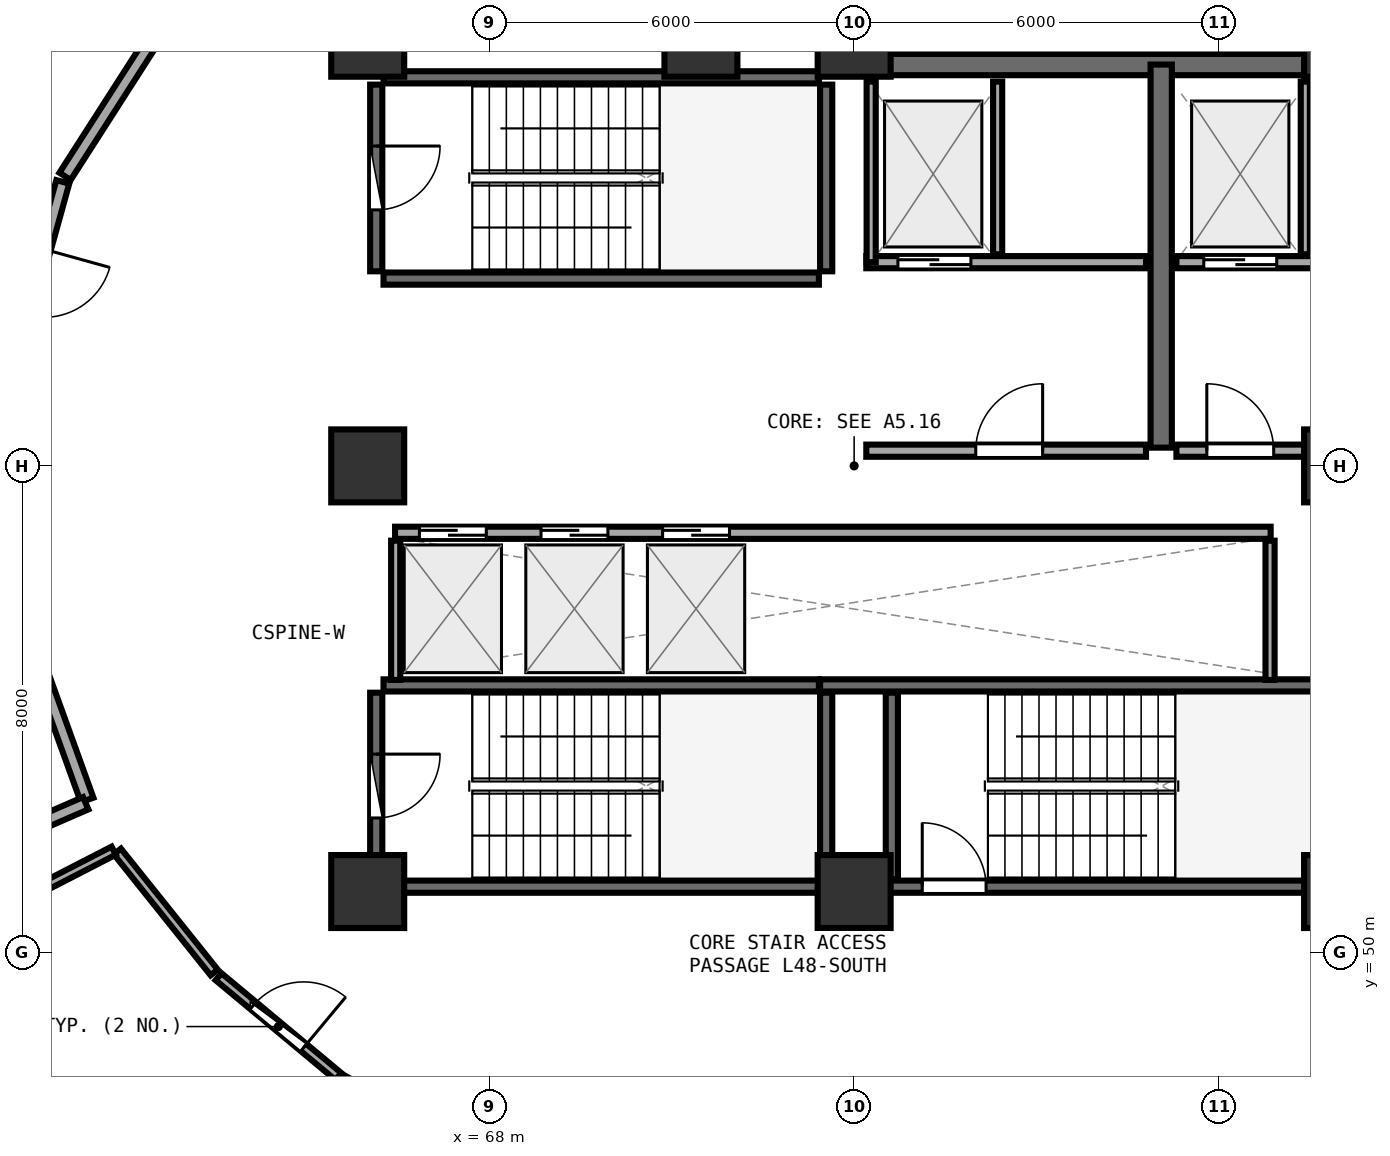
"""IFC4 building model, lengths in metres.
Left out: names, types, materials, properties, quantities, classifications, styles, units other than length and angle.
Written with IfcOpenShell. Run it as: python <this file> out.ifc"""

import sys

from ifc_helpers import new_model, si_unit, direction, frame, frame_2d, origin, origin_2d, place, context, subcontext, project, spatial, rectangle, extrude, element, fill, save


model = new_model("IFC4")
c1 = context("Model", 3, precision=1e-05, world=origin(), true_north=direction((0.0, 1.0)))
c2 = subcontext(c1, "Body", "Model", "MODEL_VIEW")
j1 = project(units=[si_unit("LENGTHUNIT", "METRE"), si_unit("PLANEANGLEUNIT", "RADIAN")], contexts=[c1])
p1 = place(None, origin())
s1 = spatial("IfcSite", under=j1, at=p1, CompositionType="ELEMENT")
p2 = place(p1, origin())
s2 = spatial("IfcBuilding", under=s1, at=p2, CompositionType="ELEMENT")
p3 = place(p2, frame((0.0, 0.0, 189.11)))
s3 = spatial("IfcBuildingStorey", under=s2, at=p3, CompositionType="ELEMENT", Elevation=189.11)
for number, where, z_axis, x_axis in (
    (1, (66.0, 51.0, 0.0), (0.0, 0.0, 1.0), (1.0, 0.0, 0.0)),
    (2, (74.0, 51.0, 0.0), (0.0, 0.0, 1.0), (1.0, 0.0, 0.0)),
    (3, (82.0, 51.0, 0.0), (0.0, 0.0, 1.0), (1.0, 0.0, 0.0)),
    (4, (82.0, 58.0, 0.0), (0.0, 0.0, 1.0), (1.0, 0.0, 0.0)),
    (5, (82.0, 65.0, 0.0), (0.0, 0.0, 1.0), (1.0, 0.0, 0.0)),
    (6, (74.0, 65.0, 0.0), (0.0, 0.0, 1.0), (1.0, 0.0, 0.0)),
    (7, (71.48, 65.0, 0.0), (0.0, 0.0, 1.0), (1.0, 0.0, 0.0)),
    (8, (66.0, 65.0, 0.0), (0.0, 0.0, 1.0), (1.0, 0.0, 0.0)),
    (9, (66.0, 58.0, 0.0), (0.0, 0.0, 1.0), (1.0, 0.0, 0.0)),
):
    element("IfcColumn", number, at=place(p3, frame(where, z_axis=z_axis, x_axis=x_axis)), inside=s3, PredefinedType="PILASTER", context=c2, shape_type="SweptSolid", body=[
        extrude(rectangle(XDim=1.2, YDim=1.2, at=origin_2d()), origin(), (0.0, 0.0, 1.0), 4.09),
    ])
p4 = place(p3, frame((66.26, 61.08, 0.0), z_axis=(0.0, 0.0, 1.0), x_axis=(1.0, 0.0, 0.0)))
e10 = element("IfcWall", 10, at=p4, inside=s3, PredefinedType="SHEAR", context=c2, shape_type="SweptSolid", body=[
    extrude(rectangle(XDim=7.16, YDim=0.2, at=frame_2d((3.58, 0.0))), origin(), (0.0, 0.0, 1.0), 3.83),
])
p5 = place(p3, frame((73.54, 61.2, 0.0), z_axis=(0.0, 0.0, 1.0), x_axis=(0.0, 1.0, 0.0)))
e11 = element("IfcWall", 11, at=p5, inside=s3, PredefinedType="SHEAR", context=c2, shape_type="SweptSolid", body=[
    extrude(rectangle(XDim=3.07, YDim=0.2, at=frame_2d((1.535, 0.0))), origin(), (0.0, 0.0, 1.0), 3.83),
])
p6 = place(p3, frame((73.42, 64.39, 0.0), z_axis=(0.0, 0.0, 1.0), x_axis=(-1.0, 0.0, 0.0)))
e12 = element("IfcWall", 12, at=p6, inside=s3, PredefinedType="SHEAR", context=c2, shape_type="SweptSolid", body=[
    extrude(rectangle(XDim=7.16, YDim=0.2, at=frame_2d((3.58, 0.0))), origin(), (0.0, 0.0, 1.0), 3.83),
])
p7 = place(p3, frame((66.14, 64.27, 0.0), z_axis=(0.0, 0.0, 1.0), x_axis=(0.0, -1.0, 0.0)))
e13 = element("IfcWall", 13, at=p7, inside=s3, PredefinedType="SHEAR", context=c2, shape_type="SweptSolid", body=[
    extrude(rectangle(XDim=3.07, YDim=0.2, at=frame_2d((1.535, 0.0))), origin(), (0.0, 0.0, 1.0), 3.83),
])
p8 = place(p7, frame((1.01, 0.0, 0.0)))
e14 = element("IfcOpeningElement", 14, at=p8, cuts=e13, PredefinedType="OPENING", context=c2, shape_type="SweptSolid", body=[
    extrude(rectangle(XDim=1.05, YDim=2.1, at=frame_2d((0.525, 1.05))), frame((0.0, 0.11, 0.0), z_axis=(0.0, -1.0, 0.0), x_axis=(1.0, 0.0, 0.0)), (0.0, 0.0, 1.0), 0.22),
])
p9 = place(p3, frame((74.0, 51.08, 0.0), z_axis=(0.0, 0.0, 1.0), x_axis=(1.0, 0.0, 0.0)))
e15 = element("IfcWall", 15, at=p9, inside=s3, PredefinedType="SHEAR", context=c2, shape_type="SweptSolid", body=[
    extrude(rectangle(XDim=7.9, YDim=0.2, at=frame_2d((3.95, 0.0))), origin(), (0.0, 0.0, 1.0), 3.83),
])
p10 = place(p9, frame((1.12, 0.0, 0.0)))
e16 = element("IfcOpeningElement", 16, at=p10, cuts=e15, PredefinedType="OPENING", context=c2, shape_type="SweptSolid", body=[
    extrude(rectangle(XDim=1.05, YDim=2.1, at=frame_2d((0.525, 1.05))), frame((0.0, 0.11, 0.0), z_axis=(0.0, -1.0, 0.0), x_axis=(1.0, 0.0, 0.0)), (0.0, 0.0, 1.0), 0.22),
])
p11 = place(p3, frame((81.9, 54.39, 0.0), z_axis=(0.0, 0.0, 1.0), x_axis=(-1.0, 0.0, 0.0)))
e17 = element("IfcWall", 17, at=p11, inside=s3, PredefinedType="SHEAR", context=c2, shape_type="SweptSolid", body=[
    extrude(rectangle(XDim=8.46, YDim=0.2, at=frame_2d((4.23, 0.0))), origin(), (0.0, 0.0, 1.0), 3.83),
])
p12 = place(p3, frame((74.62, 54.27, 0.0), z_axis=(0.0, 0.0, 1.0), x_axis=(0.0, -1.0, 0.0)))
e18 = element("IfcWall", 18, at=p12, inside=s3, PredefinedType="SHEAR", context=c2, shape_type="SweptSolid", body=[
    extrude(rectangle(XDim=3.07, YDim=0.2, at=frame_2d((1.535, 0.0))), origin(), (0.0, 0.0, 1.0), 3.83),
])
p13 = place(p3, frame((66.26, 51.08, 0.0), z_axis=(0.0, 0.0, 1.0), x_axis=(1.0, 0.0, 0.0)))
e19 = element("IfcWall", 19, at=p13, inside=s3, PredefinedType="SHEAR", context=c2, shape_type="SweptSolid", body=[
    extrude(rectangle(XDim=7.16, YDim=0.2, at=frame_2d((3.58, 0.0))), origin(), (0.0, 0.0, 1.0), 3.83),
])
p14 = place(p3, frame((73.54, 51.2, 0.0), z_axis=(0.0, 0.0, 1.0), x_axis=(0.0, 1.0, 0.0)))
e20 = element("IfcWall", 20, at=p14, inside=s3, PredefinedType="SHEAR", context=c2, shape_type="SweptSolid", body=[
    extrude(rectangle(XDim=3.07, YDim=0.2, at=frame_2d((1.535, 0.0))), origin(), (0.0, 0.0, 1.0), 3.83),
])
p15 = place(p3, frame((73.42, 54.39, 0.0), z_axis=(0.0, 0.0, 1.0), x_axis=(-1.0, 0.0, 0.0)))
e21 = element("IfcWall", 21, at=p15, inside=s3, PredefinedType="SHEAR", context=c2, shape_type="SweptSolid", body=[
    extrude(rectangle(XDim=7.16, YDim=0.2, at=frame_2d((3.58, 0.0))), origin(), (0.0, 0.0, 1.0), 3.83),
])
p16 = place(p3, frame((66.14, 54.27, 0.0), z_axis=(0.0, 0.0, 1.0), x_axis=(0.0, -1.0, 0.0)))
e22 = element("IfcWall", 22, at=p16, inside=s3, PredefinedType="SHEAR", context=c2, shape_type="SweptSolid", body=[
    extrude(rectangle(XDim=3.07, YDim=0.2, at=frame_2d((1.535, 0.0))), origin(), (0.0, 0.0, 1.0), 3.83),
])
p17 = place(p16, frame((1.01, 0.0, 0.0)))
e23 = element("IfcOpeningElement", 23, at=p17, cuts=e22, PredefinedType="OPENING", context=c2, shape_type="SweptSolid", body=[
    extrude(rectangle(XDim=1.05, YDim=2.1, at=frame_2d((0.525, 1.05))), frame((0.0, 0.11, 0.0), z_axis=(0.0, -1.0, 0.0), x_axis=(1.0, 0.0, 0.0)), (0.0, 0.0, 1.0), 0.22),
])
p18 = place(p3, frame((74.0, 64.6, 0.0), z_axis=(0.0, 0.0, 1.0), x_axis=(1.0, 0.0, 0.0)))
e24 = element("IfcWall", 24, at=p18, inside=s3, PredefinedType="SHEAR", context=c2, shape_type="SweptSolid", body=[
    extrude(rectangle(XDim=8.0, YDim=0.35, at=frame_2d((4.0, 0.0))), origin(), (0.0, 0.0, 1.0), 3.83),
])
p19 = place(p3, frame((79.05, 58.3, 0.0), z_axis=(0.0, 0.0, 1.0), x_axis=(0.0, 1.0, 0.0)))
e25 = element("IfcWall", 25, at=p19, inside=s3, PredefinedType="SHEAR", context=c2, shape_type="SweptSolid", body=[
    extrude(rectangle(XDim=6.3, YDim=0.35, at=frame_2d((3.15, 0.0))), origin(), (0.0, 0.0, 1.0), 3.83),
])
p20 = place(p3, frame((74.2, 61.35, 0.0), z_axis=(0.0, 0.0, 1.0), x_axis=(1.0, 0.0, 0.0)))
e26 = element("IfcWall", 26, at=p20, inside=s3, PredefinedType="SOLIDWALL", context=c2, shape_type="SweptSolid", body=[
    extrude(rectangle(XDim=4.6, YDim=0.2, at=frame_2d((2.3, 0.0))), origin(), (0.0, 0.0, 1.0), 3.82),
])
p21 = place(p20, frame((0.52, 0.0, 0.0)))
e27 = element("IfcOpeningElement", 27, at=p21, cuts=e26, PredefinedType="OPENING", context=c2, shape_type="SweptSolid", body=[
    extrude(rectangle(XDim=1.2, YDim=2.15, at=frame_2d((0.6, 1.075))), frame((0.0, 0.11, 0.0), z_axis=(0.0, -1.0, 0.0), x_axis=(1.0, 0.0, 0.0)), (0.0, 0.0, 1.0), 0.22),
])
p22 = place(p3, frame((74.28, 61.35, 0.0), z_axis=(0.0, 0.0, 1.0), x_axis=(0.0, 1.0, 0.0)))
e28 = element("IfcWall", 28, at=p22, inside=s3, PredefinedType="PARTITIONING", context=c2, shape_type="SweptSolid", body=[
    extrude(rectangle(XDim=2.97, YDim=0.15, at=frame_2d((1.485, 0.0))), origin(), (0.0, 0.0, 1.0), 3.82),
])
p23 = place(p3, frame((76.36, 61.48, 0.0), z_axis=(0.0, 0.0, 1.0), x_axis=(0.0, 1.0, 0.0)))
e29 = element("IfcWall", 29, at=p23, inside=s3, PredefinedType="PARTITIONING", context=c2, shape_type="SweptSolid", body=[
    extrude(rectangle(XDim=2.84, YDim=0.15, at=frame_2d((1.42, 0.0))), origin(), (0.0, 0.0, 1.0), 3.82),
])
p24 = place(p3, frame((79.3, 61.35, 0.0), z_axis=(0.0, 0.0, 1.0), x_axis=(1.0, 0.0, 0.0)))
e30 = element("IfcWall", 30, at=p24, inside=s3, PredefinedType="SOLIDWALL", context=c2, shape_type="SweptSolid", body=[
    extrude(rectangle(XDim=4.0, YDim=0.2, at=frame_2d((2.0, 0.0))), origin(), (0.0, 0.0, 1.0), 3.115),
])
p25 = place(p24, frame((0.45, 0.0, 0.0)))
e31 = element("IfcOpeningElement", 31, at=p25, cuts=e30, PredefinedType="OPENING", context=c2, shape_type="SweptSolid", body=[
    extrude(rectangle(XDim=1.2, YDim=2.15, at=frame_2d((0.6, 1.075))), frame((0.0, 0.11, 0.0), z_axis=(0.0, -1.0, 0.0), x_axis=(1.0, 0.0, 0.0)), (0.0, 0.0, 1.0), 0.22),
])
p26 = place(p3, frame((81.42, 61.48, 0.0), z_axis=(0.0, 0.0, 1.0), x_axis=(0.0, 1.0, 0.0)))
e32 = element("IfcWall", 32, at=p26, inside=s3, PredefinedType="PARTITIONING", context=c2, shape_type="SweptSolid", body=[
    extrude(rectangle(XDim=2.84, YDim=0.15, at=frame_2d((1.42, 0.0))), origin(), (0.0, 0.0, 1.0), 3.82),
])
p27 = place(p3, frame((74.2, 58.25, 0.0), z_axis=(0.0, 0.0, 1.0), x_axis=(1.0, 0.0, 0.0)))
e33 = element("IfcWall", 33, at=p27, inside=s3, PredefinedType="SOLIDWALL", context=c2, shape_type="SweptSolid", body=[
    extrude(rectangle(XDim=4.6, YDim=0.2, at=frame_2d((2.3, 0.0))), origin(), (0.0, 0.0, 1.0), 3.82),
])
p28 = place(p27, frame((1.8, 0.0, 0.0)))
e34 = element("IfcOpeningElement", 34, at=p28, cuts=e33, PredefinedType="OPENING", context=c2, shape_type="SweptSolid", body=[
    extrude(rectangle(XDim=1.1, YDim=2.1, at=frame_2d((0.55, 1.05))), frame((0.0, 0.11, 0.0), z_axis=(0.0, -1.0, 0.0), x_axis=(1.0, 0.0, 0.0)), (0.0, 0.0, 1.0), 0.22),
])
p29 = place(p3, frame((79.3, 58.25, 0.0), z_axis=(0.0, 0.0, 1.0), x_axis=(1.0, 0.0, 0.0)))
e35 = element("IfcWall", 35, at=p29, inside=s3, PredefinedType="SOLIDWALL", context=c2, shape_type="SweptSolid", body=[
    extrude(rectangle(XDim=4.0, YDim=0.2, at=frame_2d((2.0, 0.0))), origin(), (0.0, 0.0, 1.0), 3.115),
])
p30 = place(p29, frame((0.5, 0.0, 0.0)))
e36 = element("IfcOpeningElement", 36, at=p30, cuts=e35, PredefinedType="OPENING", context=c2, shape_type="SweptSolid", body=[
    extrude(rectangle(XDim=1.1, YDim=2.1, at=frame_2d((0.55, 1.05))), frame((0.0, 0.11, 0.0), z_axis=(0.0, -1.0, 0.0), x_axis=(1.0, 0.0, 0.0)), (0.0, 0.0, 1.0), 0.22),
])
p31 = place(p3, frame((66.45, 56.9, 0.0), z_axis=(0.0, 0.0, 1.0), x_axis=(1.0, 0.0, 0.0)))
e37 = element("IfcWall", 37, at=p31, inside=s3, PredefinedType="SOLIDWALL", context=c2, shape_type="SweptSolid", body=[
    extrude(rectangle(XDim=14.4, YDim=0.2, at=frame_2d((7.2, 0.0))), origin(), (0.0, 0.0, 1.0), 3.82),
])
p32 = place(p31, frame((0.4, 0.0, 0.0)))
e38 = element("IfcOpeningElement", 38, at=p32, cuts=e37, PredefinedType="OPENING", context=c2, shape_type="SweptSolid", body=[
    extrude(rectangle(XDim=1.1, YDim=2.1, at=frame_2d((0.55, 1.05))), frame((0.0, 0.11, 0.0), z_axis=(0.0, -1.0, 0.0), x_axis=(1.0, 0.0, 0.0)), (0.0, 0.0, 1.0), 0.22),
])
p33 = place(p31, frame((2.4, 0.0, 0.0)))
e39 = element("IfcOpeningElement", 39, at=p33, cuts=e37, PredefinedType="OPENING", context=c2, shape_type="SweptSolid", body=[
    extrude(rectangle(XDim=1.1, YDim=2.1, at=frame_2d((0.55, 1.05))), frame((0.0, 0.11, 0.0), z_axis=(0.0, -1.0, 0.0), x_axis=(1.0, 0.0, 0.0)), (0.0, 0.0, 1.0), 0.22),
])
p34 = place(p31, frame((4.4, 0.0, 0.0)))
e40 = element("IfcOpeningElement", 40, at=p34, cuts=e37, PredefinedType="OPENING", context=c2, shape_type="SweptSolid", body=[
    extrude(rectangle(XDim=1.1, YDim=2.1, at=frame_2d((0.55, 1.05))), frame((0.0, 0.11, 0.0), z_axis=(0.0, -1.0, 0.0), x_axis=(1.0, 0.0, 0.0)), (0.0, 0.0, 1.0), 0.22),
])
for number, where, z_axis, x_axis in (
    (41, (66.46, 54.48, 0.0), (0.0, 0.0, 1.0), (0.0, 1.0, 0.0)),
    (42, (80.84, 54.48, 0.0), (0.0, 0.0, 1.0), (0.0, 1.0, 0.0)),
):
    element("IfcWall", number, at=place(p3, frame(where, z_axis=z_axis, x_axis=x_axis)), inside=s3, PredefinedType="PARTITIONING", context=c2, shape_type="SweptSolid", body=[
        extrude(rectangle(XDim=2.29, YDim=0.15, at=frame_2d((1.145, 0.0))), origin(), (0.0, 0.0, 1.0), 3.82),
    ])
p35 = place(p3, frame((60.985, 62.67, 0.0), z_axis=(0.0, 0.0, 1.0), x_axis=(-0.266899498811, -0.96372436803, 0.0)))
e43 = element("IfcWall", 43, at=p35, inside=s3, PredefinedType="SOLIDWALL", context=c2, shape_type="SweptSolid", body=[
    extrude(rectangle(XDim=3.417, YDim=0.22, at=frame_2d((1.709, 0.0))), origin(), (0.0, 0.0, 1.0), 3.82),
])
p36 = place(p35, frame((1.149, 0.0, 0.0)))
e44 = element("IfcOpeningElement", 44, at=p36, cuts=e43, PredefinedType="OPENING", context=c2, shape_type="SweptSolid", body=[
    extrude(rectangle(XDim=1.12, YDim=2.1, at=frame_2d((0.56, 1.05))), frame((0.0, 0.12, 0.0), z_axis=(0.0, -1.0, 0.0), x_axis=(1.0, 0.0, 0.0)), (0.0, 0.0, 1.0), 0.24),
])
p37 = place(p3, frame((63.546, 49.6, 0.0), z_axis=(0.0, 0.0, 1.0), x_axis=(0.768626986837, -0.639697237063, 0.0)))
e45 = element("IfcWall", 45, at=p37, inside=s3, PredefinedType="PARTITIONING", context=c2, shape_type="SweptSolid", body=[
    extrude(rectangle(XDim=2.564, YDim=0.15, at=frame_2d((1.282, 0.0))), origin(), (0.0, 0.0, 1.0), 3.365),
])
p38 = place(p37, frame((0.742, 0.0, 0.0)))
e46 = element("IfcOpeningElement", 46, at=p38, cuts=e45, PredefinedType="OPENING", context=c2, shape_type="SweptSolid", body=[
    extrude(rectangle(XDim=1.08, YDim=2.1, at=frame_2d((0.54, 1.05))), frame((0.0, 0.085, 0.0), z_axis=(0.0, -1.0, 0.0), x_axis=(1.0, 0.0, 0.0)), (0.0, 0.0, 1.0), 0.17),
])
p39 = place(p3, frame((62.93, 65.736, 0.0), z_axis=(0.0, 0.0, 1.0), x_axis=(-0.539849412271, -0.841761612376, 0.0)))
e47 = element("IfcWall", 47, at=p39, inside=s3, PredefinedType="SOLIDWALL", context=c2, shape_type="SweptSolid", body=[
    extrude(rectangle(XDim=3.534, YDim=0.22, at=frame_2d((1.767, 0.0))), origin(), (0.0, 0.0, 1.0), 3.365),
])
p40 = place(p3, frame((60.207, 55.771, 0.0), z_axis=(0.0, 0.0, 1.0), x_axis=(0.339545974416, -0.940589459466, 0.0)))
e48 = element("IfcWall", 48, at=p40, inside=s3, PredefinedType="SOLIDWALL", context=c2, shape_type="SweptSolid", body=[
    extrude(rectangle(XDim=3.472, YDim=0.22, at=frame_2d((1.736, 0.0))), origin(), (0.0, 0.0, 1.0), 3.575),
])
p41 = place(p3, frame((61.362, 52.452, 0.0), z_axis=(0.0, 0.0, 1.0), x_axis=(-0.917129606151, -0.398589118668, 0.0)))
e49 = element("IfcWall", 49, at=p41, inside=s3, PredefinedType="SOLIDWALL", context=c2, shape_type="SweptSolid", body=[
    extrude(rectangle(XDim=7.103, YDim=0.22, at=frame_2d((3.552, 0.0))), origin(), (0.0, 0.0, 1.0), 3.365),
])
p42 = place(p3, frame((61.883, 51.659, 0.0), z_axis=(0.0, 0.0, 1.0), x_axis=(0.62480020311, -0.780784673385, 0.0)))
e50 = element("IfcWall", 50, at=p42, inside=s3, PredefinedType="PARTITIONING", context=c2, shape_type="SweptSolid", body=[
    extrude(rectangle(XDim=2.548, YDim=0.15, at=frame_2d((1.274, 0.0))), origin(), (0.0, 0.0, 1.0), 3.365),
])
p43 = place(p3, frame((65.598, 47.902, 0.0), z_axis=(0.0, 0.0, 1.0), x_axis=(0.877526475728, -0.479528189366, 0.0)))
e51 = element("IfcWall", 51, at=p43, inside=s3, PredefinedType="PARTITIONING", context=c2, shape_type="SweptSolid", body=[
    extrude(rectangle(XDim=2.656, YDim=0.15, at=frame_2d((1.328, 0.0))), origin(), (0.0, 0.0, 1.0), 3.575),
])
p44 = place(p3, frame((55.546, 48.443, 0.0), z_axis=(0.0, 0.0, 1.0), x_axis=(0.889277753714, 0.457367551045, 0.0)))
e52 = element("IfcWall", 52, at=p44, inside=s3, PredefinedType="PARTITIONING", context=c2, shape_type="SweptSolid", body=[
    extrude(rectangle(XDim=7.058, YDim=0.15, at=frame_2d((3.529, 0.0))), origin(), (0.0, 0.0, 1.0), 3.365),
])
p45 = place(p3, frame((80.181, 46.677, 0.0), z_axis=(0.0, 0.0, 1.0), x_axis=(0.87161551792, 0.49019015588, 0.0)))
e53 = element("IfcWall", 53, at=p45, inside=s3, PredefinedType="SOLIDWALL", context=c2, shape_type="SweptSolid", body=[
    extrude(rectangle(XDim=2.772, YDim=0.22, at=frame_2d((1.386, 0.0))), origin(), (0.0, 0.0, 1.0), 3.365),
])
p46 = place(p8, origin())
e54 = element("IfcDoor", 54, at=p46, inside=s3, OperationType="SINGLE_SWING_LEFT", PredefinedType="DOOR", context=c2, shape_type="SweptSolid", body=[
    extrude(rectangle(XDim=1.05, YDim=2.1, at=frame_2d((0.525, 1.05))), frame((0.0, 0.025, 0.0), z_axis=(0.0, -1.0, 0.0), x_axis=(1.0, 0.0, 0.0)), (0.0, 0.0, 1.0), 0.05),
])
fill(e14, e54)
p47 = place(p10, origin())
e55 = element("IfcDoor", 55, at=p47, inside=s3, OperationType="SINGLE_SWING_LEFT", PredefinedType="DOOR", context=c2, shape_type="SweptSolid", body=[
    extrude(rectangle(XDim=1.05, YDim=2.1, at=frame_2d((0.525, 1.05))), frame((0.0, 0.025, 0.0), z_axis=(0.0, -1.0, 0.0), x_axis=(1.0, 0.0, 0.0)), (0.0, 0.0, 1.0), 0.05),
])
fill(e16, e55)
p48 = place(p17, origin())
e56 = element("IfcDoor", 56, at=p48, inside=s3, OperationType="SINGLE_SWING_LEFT", PredefinedType="DOOR", context=c2, shape_type="SweptSolid", body=[
    extrude(rectangle(XDim=1.05, YDim=2.1, at=frame_2d((0.525, 1.05))), frame((0.0, 0.025, 0.0), z_axis=(0.0, -1.0, 0.0), x_axis=(1.0, 0.0, 0.0)), (0.0, 0.0, 1.0), 0.05),
])
fill(e23, e56)
p49 = place(p21, origin())
e57 = element("IfcDoor", 57, at=p49, inside=s3, OperationType="DOUBLE_DOOR_SLIDING", PredefinedType="DOOR", context=c2, shape_type="SweptSolid", body=[
    extrude(rectangle(XDim=1.2, YDim=2.15, at=frame_2d((0.6, 1.075))), frame((0.0, 0.025, 0.0), z_axis=(0.0, -1.0, 0.0), x_axis=(1.0, 0.0, 0.0)), (0.0, 0.0, 1.0), 0.05),
])
fill(e27, e57)
p50 = place(p25, origin())
e58 = element("IfcDoor", 58, at=p50, inside=s3, OperationType="DOUBLE_DOOR_SLIDING", PredefinedType="DOOR", context=c2, shape_type="SweptSolid", body=[
    extrude(rectangle(XDim=1.2, YDim=2.15, at=frame_2d((0.6, 1.075))), frame((0.0, 0.025, 0.0), z_axis=(0.0, -1.0, 0.0), x_axis=(1.0, 0.0, 0.0)), (0.0, 0.0, 1.0), 0.05),
])
fill(e31, e58)
p51 = place(p28, frame((1.1, 0.0, 0.0), z_axis=(0.0, 0.0, 1.0), x_axis=(-1.0, 0.0, 0.0)))
e59 = element("IfcDoor", 59, at=p51, inside=s3, OperationType="SINGLE_SWING_LEFT", PredefinedType="DOOR", context=c2, shape_type="SweptSolid", body=[
    extrude(rectangle(XDim=1.1, YDim=2.1, at=frame_2d((0.55, 1.05))), frame((0.0, 0.025, 0.0), z_axis=(0.0, -1.0, 0.0), x_axis=(1.0, 0.0, 0.0)), (0.0, 0.0, 1.0), 0.05),
])
fill(e34, e59)
p52 = place(p30, frame((1.1, 0.0, 0.0), z_axis=(0.0, 0.0, 1.0), x_axis=(-1.0, 0.0, 0.0)))
e60 = element("IfcDoor", 60, at=p52, inside=s3, OperationType="SINGLE_SWING_RIGHT", PredefinedType="DOOR", context=c2, shape_type="SweptSolid", body=[
    extrude(rectangle(XDim=1.1, YDim=2.1, at=frame_2d((0.55, 1.05))), frame((0.0, 0.025, 0.0), z_axis=(0.0, -1.0, 0.0), x_axis=(1.0, 0.0, 0.0)), (0.0, 0.0, 1.0), 0.05),
])
fill(e36, e60)
p53 = place(p32, origin())
e61 = element("IfcDoor", 61, at=p53, inside=s3, OperationType="DOUBLE_DOOR_SLIDING", PredefinedType="DOOR", context=c2, shape_type="SweptSolid", body=[
    extrude(rectangle(XDim=1.1, YDim=2.1, at=frame_2d((0.55, 1.05))), frame((0.0, 0.025, 0.0), z_axis=(0.0, -1.0, 0.0), x_axis=(1.0, 0.0, 0.0)), (0.0, 0.0, 1.0), 0.05),
])
fill(e38, e61)
p54 = place(p33, origin())
e62 = element("IfcDoor", 62, at=p54, inside=s3, OperationType="DOUBLE_DOOR_SLIDING", PredefinedType="DOOR", context=c2, shape_type="SweptSolid", body=[
    extrude(rectangle(XDim=1.1, YDim=2.1, at=frame_2d((0.55, 1.05))), frame((0.0, 0.025, 0.0), z_axis=(0.0, -1.0, 0.0), x_axis=(1.0, 0.0, 0.0)), (0.0, 0.0, 1.0), 0.05),
])
fill(e39, e62)
p55 = place(p34, origin())
e63 = element("IfcDoor", 63, at=p55, inside=s3, OperationType="DOUBLE_DOOR_SLIDING", PredefinedType="DOOR", context=c2, shape_type="SweptSolid", body=[
    extrude(rectangle(XDim=1.1, YDim=2.1, at=frame_2d((0.55, 1.05))), frame((0.0, 0.025, 0.0), z_axis=(0.0, -1.0, 0.0), x_axis=(1.0, 0.0, 0.0)), (0.0, 0.0, 1.0), 0.05),
])
fill(e40, e63)
p56 = place(p38, origin())
e64 = element("IfcDoor", 64, at=p56, inside=s3, OperationType="SINGLE_SWING_RIGHT", PredefinedType="DOOR", context=c2, shape_type="SweptSolid", body=[
    extrude(rectangle(XDim=1.08, YDim=2.1, at=frame_2d((0.54, 1.05))), frame((0.0, 0.025, 0.0), z_axis=(0.0, -1.0, 0.0), x_axis=(1.0, 0.0, 0.0)), (0.0, 0.0, 1.0), 0.05),
])
fill(e46, e64)
save(model, sys.argv[1])
